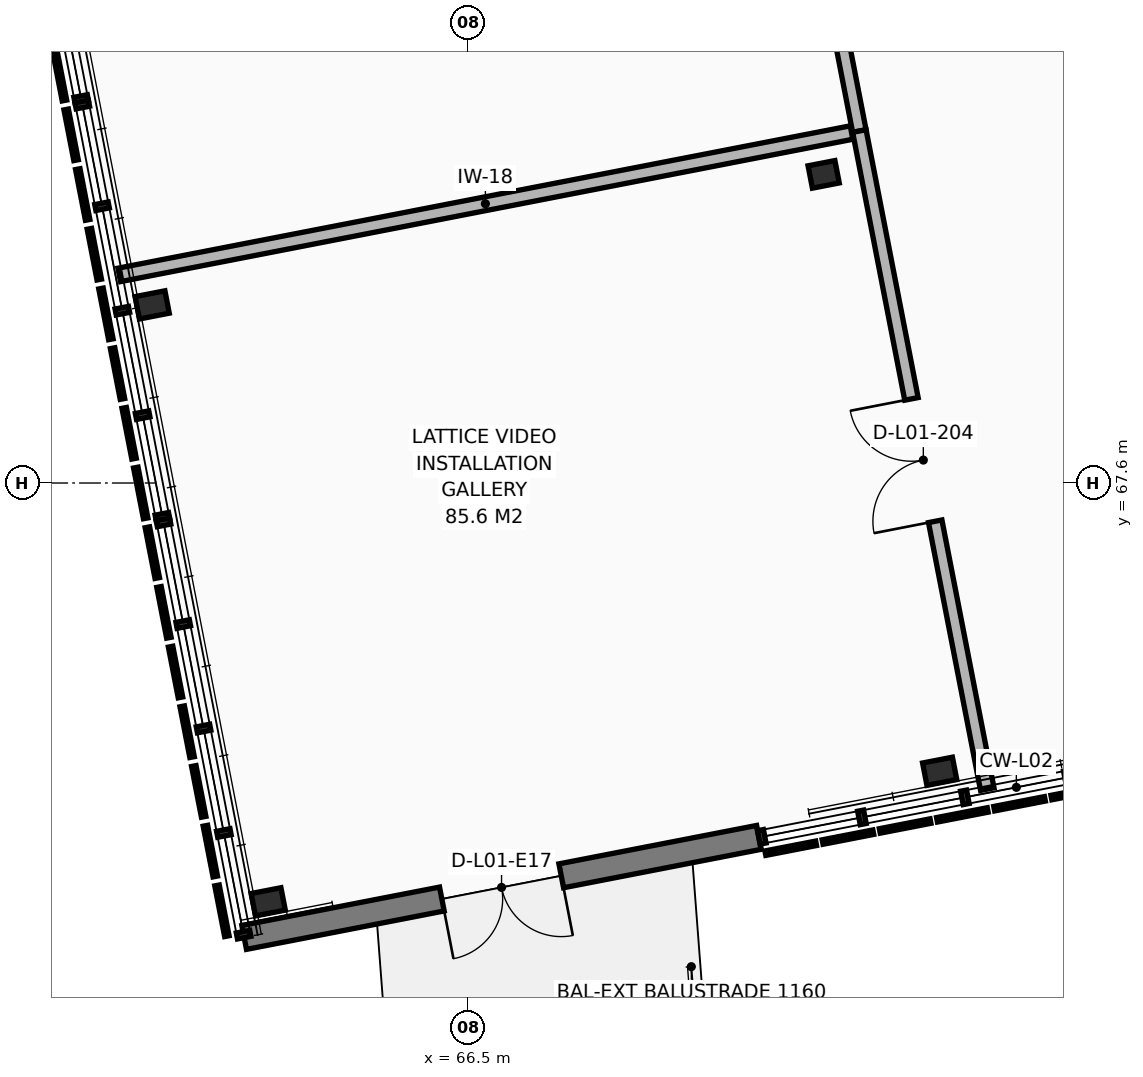
"""IFC4 building model, lengths in metres.
Left out: names, types, materials, properties, quantities, classifications, styles, units other than length and angle.
Written with IfcOpenShell. Run it as: python <this file> out.ifc"""

import sys

from ifc_helpers import new_model, si_unit, direction, frame, frame_2d, origin, origin_2d, place, context, subcontext, project, spatial, rectangle, i_section, extrude, element, fill, save


model = new_model("IFC4")
c1 = context("Model", 3, precision=1e-05, world=origin(), true_north=direction((0.0, 1.0)))
c2 = subcontext(c1, "Body", "Model", "MODEL_VIEW")
j1 = project(units=[si_unit("LENGTHUNIT", "METRE"), si_unit("PLANEANGLEUNIT", "RADIAN")], contexts=[c1])
p1 = place(None, origin())
s1 = spatial("IfcSite", under=j1, at=p1, CompositionType="ELEMENT")
p2 = place(p1, origin())
s2 = spatial("IfcBuilding", under=s1, at=p2, CompositionType="ELEMENT")
p3 = place(p2, frame((0.0, 0.0, 5.1)))
s3 = spatial("IfcBuildingStorey", under=s2, at=p3, CompositionType="ELEMENT", Elevation=5.1)
for number, where, z_axis, x_axis in (
    (1, (63.873, 62.09, 0.0), (0.0, 0.0, 1.0), (0.982, 0.191, 0.0)),
    (2, (62.346, 69.943, 0.0), (0.0, 0.0, 1.0), (0.982, 0.191, 0.0)),
    (3, (72.707, 63.807, 0.0), (0.0, 0.0, 1.0), (0.982, 0.191, 0.0)),
):
    element("IfcColumn", number, at=place(p3, frame(where, z_axis=z_axis, x_axis=x_axis)), inside=s3, PredefinedType="COLUMN", context=c2, shape_type="SweptSolid", body=[
        extrude(i_section(OverallWidth=0.3, OverallDepth=0.4, WebThickness=0.013, FlangeThickness=0.024, FilletRadius=0.027, at=origin_2d()), origin(), (0.0, 0.0, 1.0), 4.42),
    ])
p4 = place(p3, frame((71.181, 71.66, 0.0), z_axis=(0.0, 0.0, 1.0), x_axis=(0.981627183448, 0.190808995377, 0.0)))
e4 = element("IfcColumn", 4, at=p4, inside=s3, PredefinedType="COLUMN", context=c2, shape_type="SweptSolid", body=[
    extrude(i_section(OverallWidth=0.3, OverallDepth=0.36, WebThickness=0.012, FlangeThickness=0.022, FilletRadius=0.027, at=origin_2d()), origin(), (0.0, 0.0, 1.0), 4.42),
])
p5 = place(p3, frame((70.33, 62.938, 0.0), z_axis=(0.0, 0.0, 1.0), x_axis=(-0.981625148252, -0.190819465253, 0.0)))
e5 = element("IfcWall", 5, at=p5, inside=s3, PredefinedType="SOLIDWALL", context=c2, shape_type="SweptSolid", body=[
    extrude(rectangle(XDim=6.9, YDim=0.32, at=frame_2d((3.45, 0.0))), origin(), (0.0, 0.0, 1.0), 4.2),
])
p6 = place(p5, frame((2.65, 0.0, 0.0)))
e6 = element("IfcOpeningElement", 6, at=p6, cuts=e5, PredefinedType="OPENING", context=c2, shape_type="SweptSolid", body=[
    extrude(rectangle(XDim=1.6, YDim=2.2, at=frame_2d((0.8, 1.1))), frame((0.0, 0.17, 0.0), z_axis=(0.0, -1.0, 0.0), x_axis=(1.0, 0.0, 0.0)), (0.0, 0.0, 1.0), 0.34),
])
p7 = place(p3, frame((71.651, 72.23, 0.0), z_axis=(0.0, 0.0, 1.0), x_axis=(-0.190786732806, 0.981631510591, 0.0)))
e7 = element("IfcWall", 7, at=p7, inside=s3, PredefinedType="PARTITIONING", context=c2, shape_type="SweptSolid", body=[
    extrude(rectangle(XDim=7.88, YDim=0.18, at=frame_2d((3.94, 0.0))), origin(), (0.0, 0.0, 1.0), 3.79),
])
p8 = place(p7, frame((3.23, 0.0, 0.0)))
e8 = element("IfcOpeningElement", 8, at=p8, cuts=e7, PredefinedType="OPENING", context=c2, shape_type="SweptSolid", body=[
    extrude(rectangle(XDim=1.42, YDim=2.18, at=frame_2d((0.71, 1.09))), frame((0.0, 0.1, 0.0), z_axis=(0.0, -1.0, 0.0), x_axis=(1.0, 0.0, 0.0)), (0.0, 0.0, 1.0), 0.2),
])
p9 = place(p3, frame((73.333, 63.573, 0.0), z_axis=(0.0, 0.0, 1.0), x_axis=(-0.190805940679, 0.981627777216, 0.0)))
e9 = element("IfcWall", 9, at=p9, inside=s3, PredefinedType="PARTITIONING", context=c2, shape_type="SweptSolid", body=[
    extrude(rectangle(XDim=8.82, YDim=0.18, at=frame_2d((4.41, 0.0))), origin(), (0.0, 0.0, 1.0), 3.74),
])
p10 = place(p9, frame((3.59, 0.0, 0.0)))
e10 = element("IfcOpeningElement", 10, at=p10, cuts=e9, PredefinedType="OPENING", context=c2, shape_type="SweptSolid", body=[
    extrude(rectangle(XDim=1.64, YDim=2.2, at=frame_2d((0.82, 1.1))), frame((0.0, 0.1, 0.0), z_axis=(0.0, -1.0, 0.0), x_axis=(1.0, 0.0, 0.0)), (0.0, 0.0, 1.0), 0.2),
])
p11 = place(p3, frame((71.548, 72.21, 0.0), z_axis=(0.0, 0.0, 1.0), x_axis=(-0.981627297685, -0.190808407676, 0.0)))
e11 = element("IfcWall", 11, at=p11, inside=s3, PredefinedType="PARTITIONING", context=c2, shape_type="SweptSolid", body=[
    extrude(rectangle(XDim=9.815, YDim=0.18, at=frame_2d((4.908, 0.0))), origin(), (0.0, 0.0, 1.0), 3.79),
])
p12 = place(p6, origin())
e12 = element("IfcDoor", 12, at=p12, inside=s3, OperationType="DOUBLE_DOOR_SINGLE_SWING", PredefinedType="DOOR", context=c2, shape_type="SweptSolid", body=[
    extrude(rectangle(XDim=1.6, YDim=2.2, at=frame_2d((0.8, 1.1))), frame((0.0, 0.025, 0.0), z_axis=(0.0, -1.0, 0.0), x_axis=(1.0, 0.0, 0.0)), (0.0, 0.0, 1.0), 0.05),
])
fill(e6, e12)
p13 = place(p10, origin())
e13 = element("IfcDoor", 13, at=p13, inside=s3, OperationType="DOUBLE_DOOR_SINGLE_SWING", PredefinedType="DOOR", context=c2, shape_type="SweptSolid", body=[
    extrude(rectangle(XDim=1.64, YDim=2.2, at=frame_2d((0.82, 1.1))), frame((0.0, 0.025, 0.0), z_axis=(0.0, -1.0, 0.0), x_axis=(1.0, 0.0, 0.0)), (0.0, 0.0, 1.0), 0.05),
])
fill(e10, e13)
save(model, sys.argv[1])
